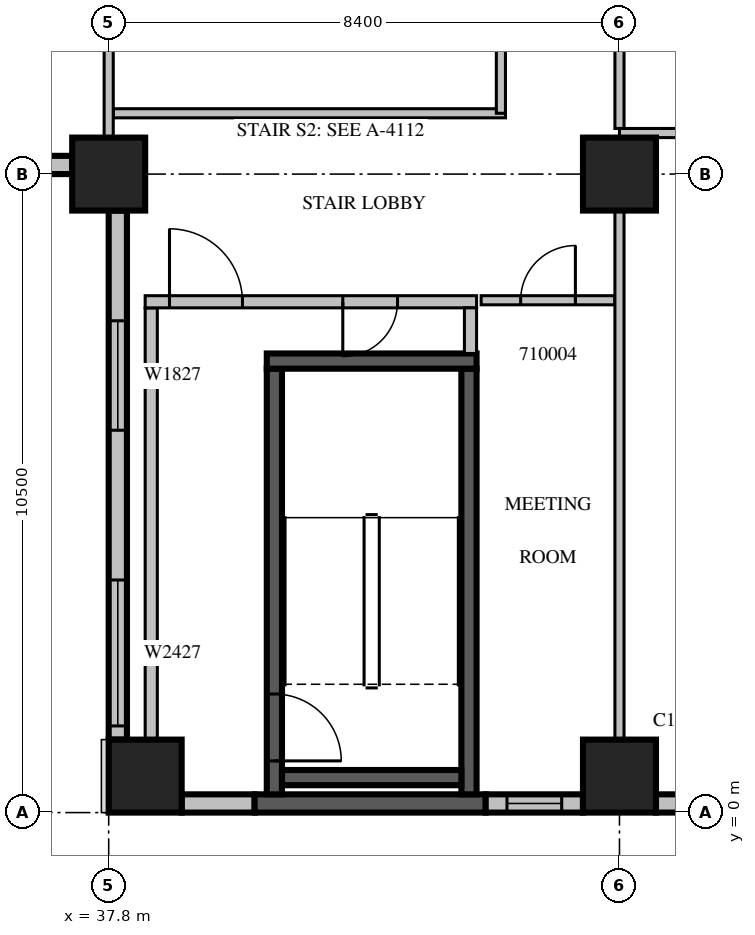
"""IFC4 building model, lengths in metres.
Left out: names, types, materials, properties, quantities, classifications, styles, units other than length and angle.
Written with IfcOpenShell. Run it as: python <this file> out.ifc"""

import sys

from ifc_helpers import new_model, si_unit, direction, frame, frame_2d, origin, origin_2d, place, context, subcontext, project, spatial, rectangle, extrude, source, transform, mapped, element, fill, save


model = new_model("IFC4")
c1 = context("Model", 3, precision=1e-05, world=origin(), true_north=direction((0.0, 1.0)))
c2 = subcontext(c1, "Body", "Model", "MODEL_VIEW")
j1 = project(units=[si_unit("LENGTHUNIT", "METRE"), si_unit("PLANEANGLEUNIT", "RADIAN")], contexts=[c1])
p1 = place(None, origin())
s1 = spatial("IfcSite", under=j1, at=p1, CompositionType="ELEMENT")
p2 = place(p1, origin())
s2 = spatial("IfcBuilding", under=s1, at=p2, CompositionType="ELEMENT")
p3 = place(p2, frame((0.0, 0.0, 53.1)))
s3 = spatial("IfcBuildingStorey", under=s2, at=p3, CompositionType="ELEMENT", Elevation=53.1)
m1 = source(origin(), c2, "Body", "SweptSolid", [
    extrude(rectangle(XDim=1.2, YDim=1.2, at=origin_2d()), origin(), (0.0, 0.0, 1.0), 4.2),
])
for number, where, z_axis, x_axis in (
    (1, (38.4, 0.6, 0.0), (0.0, 0.0, 1.0), (1.0, 0.0, 0.0)),
    (2, (46.2, 0.6, 0.0), (0.0, 0.0, 1.0), (1.0, 0.0, 0.0)),
    (3, (37.8, 10.5, 0.0), (0.0, 0.0, 1.0), (1.0, 0.0, 0.0)),
    (4, (46.2, 10.5, 0.0), (0.0, 0.0, 1.0), (1.0, 0.0, 0.0)),
):
    element("IfcColumn", number, at=place(p3, frame(where, z_axis=z_axis, x_axis=x_axis)), inside=s3, PredefinedType="COLUMN", context=c2, shape_type="MappedRepresentation", body=[
        mapped(m1, transform((0.0, 0.0, 0.0), scale=1.0)),
    ])
m2 = source(origin(), c2, "Body", "SweptSolid", [
    extrude(rectangle(XDim=7.2, YDim=0.3, at=frame_2d((3.6, 0.0))), origin(), (0.0, 0.0, 1.0), 3.8),
])
p4 = place(p3, frame((30.0, 10.65, 0.0), z_axis=(0.0, 0.0, 1.0), x_axis=(1.0, 0.0, 0.0)))
e5 = element("IfcWall", 5, at=p4, inside=s3, PredefinedType="STANDARD", context=c2, shape_type="MappedRepresentation", body=[
    mapped(m2, transform((0.0, 0.0, 0.0), scale=1.0)),
])
m3 = source(origin(), c2, "Body", "SweptSolid", [
    extrude(rectangle(XDim=1.8, YDim=2.7, at=frame_2d((0.9, 1.35))), frame((0.0, 0.16, 0.0), z_axis=(0.0, -1.0, 0.0), x_axis=(1.0, 0.0, 0.0)), (0.0, 0.0, 1.0), 0.32),
])
p5 = place(p4, frame((4.839, 0.0, 0.6)))
e6 = element("IfcOpeningElement", 6, at=p5, cuts=e5, PredefinedType="OPENING", context=c2, shape_type="MappedRepresentation", body=[
    mapped(m3, transform((0.0, 0.0, 0.0), scale=1.0)),
])
m4 = source(origin(), c2, "Body", "SweptSolid", [
    extrude(rectangle(XDim=1.2, YDim=2.7, at=frame_2d((0.6, 1.35))), frame((0.0, 0.16, 0.0), z_axis=(0.0, -1.0, 0.0), x_axis=(1.0, 0.0, 0.0)), (0.0, 0.0, 1.0), 0.32),
])
p6 = place(p4, frame((2.152, 0.0, 0.6)))
e7 = element("IfcOpeningElement", 7, at=p6, cuts=e5, PredefinedType="OPENING", context=c2, shape_type="MappedRepresentation", body=[
    mapped(m4, transform((0.0, 0.0, 0.0), scale=1.0)),
])
m5 = source(origin(), c2, "Body", "SweptSolid", [
    extrude(rectangle(XDim=8.7, YDim=0.3, at=frame_2d((4.35, 0.0))), origin(), (0.0, 0.0, 1.0), 3.8),
])
p7 = place(p3, frame((37.95, 9.9, 0.0), z_axis=(0.0, 0.0, 1.0), x_axis=(0.0, -1.0, 0.0)))
e8 = element("IfcWall", 8, at=p7, inside=s3, PredefinedType="STANDARD", context=c2, shape_type="MappedRepresentation", body=[
    mapped(m5, transform((0.0, 0.0, 0.0), scale=1.0)),
])
p8 = place(p7, frame((1.812, 0.0, 0.6)))
e9 = element("IfcOpeningElement", 9, at=p8, cuts=e8, PredefinedType="OPENING", context=c2, shape_type="MappedRepresentation", body=[
    mapped(m3, transform((0.0, 0.0, 0.0), scale=1.0)),
])
m6 = source(origin(), c2, "Body", "SweptSolid", [
    extrude(rectangle(XDim=2.4, YDim=2.7, at=frame_2d((1.2, 1.35))), frame((0.0, 0.16, 0.0), z_axis=(0.0, -1.0, 0.0), x_axis=(1.0, 0.0, 0.0)), (0.0, 0.0, 1.0), 0.32),
])
p9 = place(p7, frame((6.075, 0.0, 0.6)))
e10 = element("IfcOpeningElement", 10, at=p9, cuts=e8, PredefinedType="OPENING", context=c2, shape_type="MappedRepresentation", body=[
    mapped(m6, transform((0.0, 0.0, 0.0), scale=1.0)),
])
m7 = source(origin(), c2, "Body", "SweptSolid", [
    extrude(rectangle(XDim=1.2, YDim=0.3, at=frame_2d((0.6, 0.0))), origin(), (0.0, 0.0, 1.0), 3.8),
])
p10 = place(p3, frame((39.0, 0.15, 0.0), z_axis=(0.0, 0.0, 1.0), x_axis=(1.0, 0.0, 0.0)))
e11 = element("IfcWall", 11, at=p10, inside=s3, PredefinedType="STANDARD", context=c2, shape_type="MappedRepresentation", body=[
    mapped(m7, transform((0.0, 0.0, 0.0), scale=1.0)),
])
m8 = source(origin(), c2, "Body", "SweptSolid", [
    extrude(rectangle(XDim=3.8, YDim=0.3, at=frame_2d((1.9, 0.0))), origin(), (0.0, 0.0, 1.0), 3.8),
])
p11 = place(p3, frame((40.2, 0.15, 0.0), z_axis=(0.0, 0.0, 1.0), x_axis=(1.0, 0.0, 0.0)))
e12 = element("IfcWall", 12, at=p11, inside=s3, PredefinedType="SOLIDWALL", context=c2, shape_type="MappedRepresentation", body=[
    mapped(m8, transform((0.0, 0.0, 0.0), scale=1.0)),
])
m9 = source(origin(), c2, "Body", "SweptSolid", [
    extrude(rectangle(XDim=1.6, YDim=0.3, at=frame_2d((0.8, 0.0))), origin(), (0.0, 0.0, 1.0), 3.8),
])
p12 = place(p3, frame((44.0, 0.15, 0.0), z_axis=(0.0, 0.0, 1.0), x_axis=(1.0, 0.0, 0.0)))
e13 = element("IfcWall", 13, at=p12, inside=s3, PredefinedType="STANDARD", context=c2, shape_type="MappedRepresentation", body=[
    mapped(m9, transform((0.0, 0.0, 0.0), scale=1.0)),
])
m10 = source(origin(), c2, "Body", "SweptSolid", [
    extrude(rectangle(XDim=0.9, YDim=2.7, at=frame_2d((0.45, 1.35))), frame((0.0, 0.16, 0.0), z_axis=(0.0, -1.0, 0.0), x_axis=(1.0, 0.0, 0.0)), (0.0, 0.0, 1.0), 0.32),
])
p13 = place(p12, frame((0.35, 0.0, 0.6)))
e14 = element("IfcOpeningElement", 14, at=p13, cuts=e13, PredefinedType="OPENING", context=c2, shape_type="MappedRepresentation", body=[
    mapped(m10, transform((0.0, 0.0, 0.0), scale=1.0)),
])
m11 = source(origin(), c2, "Body", "SweptSolid", [
    extrude(rectangle(XDim=4.68, YDim=0.3, at=frame_2d((2.34, 0.0))), origin(), (0.0, 0.0, 1.0), 3.3),
])
p14 = place(p3, frame((46.8, 0.15, 0.0), z_axis=(0.0, 0.0, 1.0), x_axis=(1.0, 0.0, 0.0)))
e15 = element("IfcWall", 15, at=p14, inside=s3, PredefinedType="STANDARD", context=c2, shape_type="MappedRepresentation", body=[
    mapped(m11, transform((0.0, 0.0, 0.0), scale=1.0)),
])
m12 = source(origin(), c2, "Body", "SweptSolid", [
    extrude(rectangle(XDim=3.6, YDim=2.7, at=frame_2d((1.8, 1.35))), frame((0.0, 0.16, 0.0), z_axis=(0.0, -1.0, 0.0), x_axis=(1.0, 0.0, 0.0)), (0.0, 0.0, 1.0), 0.32),
])
p15 = place(p14, frame((0.54, 0.0, 0.6)))
e16 = element("IfcOpeningElement", 16, at=p15, cuts=e15, PredefinedType="OPENING", context=c2, shape_type="MappedRepresentation", body=[
    mapped(m12, transform((0.0, 0.0, 0.0), scale=1.0)),
])
m13 = source(origin(), c2, "Body", "SweptSolid", [
    extrude(rectangle(XDim=7.0, YDim=0.25, at=frame_2d((3.5, 0.0))), origin(), (0.0, 0.0, 1.0), 3.8),
])
p16 = place(p3, frame((40.525, 0.3, 0.0), z_axis=(0.0, 0.0, 1.0), x_axis=(0.0, 1.0, 0.0)))
e17 = element("IfcWall", 17, at=p16, inside=s3, PredefinedType="SOLIDWALL", context=c2, shape_type="MappedRepresentation", body=[
    mapped(m13, transform((0.0, 0.0, 0.0), scale=1.0)),
])
m14 = source(origin(), c2, "Body", "SweptSolid", [
    extrude(rectangle(XDim=1.1, YDim=2.1, at=frame_2d((0.55, 1.05))), frame((0.0, 0.135, 0.0), z_axis=(0.0, -1.0, 0.0), x_axis=(1.0, 0.0, 0.0)), (0.0, 0.0, 1.0), 0.27),
])
p17 = place(p16, frame((0.55, 0.0, 0.0)))
e18 = element("IfcOpeningElement", 18, at=p17, cuts=e17, PredefinedType="OPENING", context=c2, shape_type="MappedRepresentation", body=[
    mapped(m14, transform((0.0, 0.0, 0.0), scale=1.0)),
])
p18 = place(p3, frame((43.725, 0.3, 0.0), z_axis=(0.0, 0.0, 1.0), x_axis=(0.0, 1.0, 0.0)))
e19 = element("IfcWall", 19, at=p18, inside=s3, PredefinedType="SOLIDWALL", context=c2, shape_type="MappedRepresentation", body=[
    mapped(m13, transform((0.0, 0.0, 0.0), scale=1.0)),
])
m15 = source(origin(), c2, "Body", "SweptSolid", [
    extrude(rectangle(XDim=3.45, YDim=0.25, at=frame_2d((1.725, 0.0))), origin(), (0.0, 0.0, 1.0), 3.8),
])
p19 = place(p3, frame((40.4, 7.425, 0.0), z_axis=(0.0, 0.0, 1.0), x_axis=(1.0, 0.0, 0.0)))
e20 = element("IfcWall", 20, at=p19, inside=s3, PredefinedType="SOLIDWALL", context=c2, shape_type="MappedRepresentation", body=[
    mapped(m15, transform((0.0, 0.0, 0.0), scale=1.0)),
])
m16 = source(origin(), c2, "Body", "SweptSolid", [
    extrude(rectangle(XDim=2.95, YDim=0.25, at=frame_2d((1.475, 0.0))), origin(), (0.0, 0.0, 1.0), 3.8),
])
p20 = place(p3, frame((40.65, 0.575, 0.0), z_axis=(0.0, 0.0, 1.0), x_axis=(1.0, 0.0, 0.0)))
e21 = element("IfcWall", 21, at=p20, inside=s3, PredefinedType="SOLIDWALL", context=c2, shape_type="MappedRepresentation", body=[
    mapped(m16, transform((0.0, 0.0, 0.0), scale=1.0)),
])
m17 = source(origin(), c2, "Body", "SweptSolid", [
    extrude(rectangle(XDim=8.0, YDim=0.2, at=frame_2d((4.0, 0.0))), origin(), (0.0, 0.0, 1.0), 3.8),
])
p21 = place(p3, frame((38.5, 0.3, 0.0), z_axis=(0.0, 0.0, 1.0), x_axis=(0.0, 1.0, 0.0)))
e22 = element("IfcWall", 22, at=p21, inside=s3, PredefinedType="PARTITIONING", context=c2, shape_type="MappedRepresentation", body=[
    mapped(m17, transform((0.0, 0.0, 0.0), scale=1.0)),
])
m18 = source(origin(), c2, "Body", "SweptSolid", [
    extrude(rectangle(XDim=5.45, YDim=0.2, at=frame_2d((2.725, 0.0))), origin(), (0.0, 0.0, 1.0), 3.8),
])
p22 = place(p3, frame((38.4, 8.4, 0.0), z_axis=(0.0, 0.0, 1.0), x_axis=(1.0, 0.0, 0.0)))
e23 = element("IfcWall", 23, at=p22, inside=s3, PredefinedType="PARTITIONING", context=c2, shape_type="MappedRepresentation", body=[
    mapped(m18, transform((0.0, 0.0, 0.0), scale=1.0)),
])
m19 = source(origin(), c2, "Body", "SweptSolid", [
    extrude(rectangle(XDim=1.2, YDim=2.1, at=frame_2d((0.6, 1.05))), frame((0.0, 0.11, 0.0), z_axis=(0.0, -1.0, 0.0), x_axis=(1.0, 0.0, 0.0)), (0.0, 0.0, 1.0), 0.22),
])
p23 = place(p22, frame((0.4, 0.0, 0.0)))
e24 = element("IfcOpeningElement", 24, at=p23, cuts=e23, PredefinedType="OPENING", context=c2, shape_type="MappedRepresentation", body=[
    mapped(m19, transform((0.0, 0.0, 0.0), scale=1.0)),
])
m20 = source(origin(), c2, "Body", "SweptSolid", [
    extrude(rectangle(XDim=0.9, YDim=2.1, at=frame_2d((0.45, 1.05))), frame((0.0, 0.11, 0.0), z_axis=(0.0, -1.0, 0.0), x_axis=(1.0, 0.0, 0.0)), (0.0, 0.0, 1.0), 0.22),
])
p24 = place(p22, frame((3.25, 0.0, 0.0)))
e25 = element("IfcOpeningElement", 25, at=p24, cuts=e23, PredefinedType="OPENING", context=c2, shape_type="MappedRepresentation", body=[
    mapped(m20, transform((0.0, 0.0, 0.0), scale=1.0)),
])
m21 = source(origin(), c2, "Body", "SweptSolid", [
    extrude(rectangle(XDim=0.75, YDim=0.2, at=frame_2d((0.375, 0.0))), origin(), (0.0, 0.0, 1.0), 3.8),
])
p25 = place(p3, frame((43.75, 7.55, 0.0), z_axis=(0.0, 0.0, 1.0), x_axis=(0.0, 1.0, 0.0)))
e26 = element("IfcWall", 26, at=p25, inside=s3, PredefinedType="PARTITIONING", context=c2, shape_type="MappedRepresentation", body=[
    mapped(m21, transform((0.0, 0.0, 0.0), scale=1.0)),
])
m22 = source(origin(), c2, "Body", "SweptSolid", [
    extrude(rectangle(XDim=6.45, YDim=0.15, at=frame_2d((3.225, 0.0))), origin(), (0.0, 0.0, 1.0), 3.8),
])
p26 = place(p3, frame((37.875, 11.5, 0.0), z_axis=(0.0, 0.0, 1.0), x_axis=(1.0, 0.0, 0.0)))
e27 = element("IfcWall", 27, at=p26, inside=s3, PredefinedType="PARTITIONING", context=c2, shape_type="MappedRepresentation", body=[
    mapped(m22, transform((0.0, 0.0, 0.0), scale=1.0)),
])
m23 = source(origin(), c2, "Body", "SweptSolid", [
    extrude(rectangle(XDim=3.575, YDim=0.15, at=frame_2d((1.788, 0.0))), origin(), (0.0, 0.0, 1.0), 3.8),
])
p27 = place(p3, frame((44.25, 11.5, 0.0), z_axis=(0.0, 0.0, 1.0), x_axis=(0.0, 1.0, 0.0)))
e28 = element("IfcWall", 28, at=p27, inside=s3, PredefinedType="PARTITIONING", context=c2, shape_type="MappedRepresentation", body=[
    mapped(m23, transform((0.0, 0.0, 0.0), scale=1.0)),
])
m24 = source(origin(), c2, "Body", "SweptSolid", [
    extrude(rectangle(XDim=2.2, YDim=0.15, at=frame_2d((1.1, 0.0))), origin(), (0.0, 0.0, 1.0), 3.8),
])
p28 = place(p3, frame((46.125, 8.425, 0.0), z_axis=(0.0, 0.0, 1.0), x_axis=(-1.0, 0.0, 0.0)))
e29 = element("IfcWall", 29, at=p28, inside=s3, PredefinedType="PARTITIONING", context=c2, shape_type="MappedRepresentation", body=[
    mapped(m24, transform((0.0, 0.0, 0.0), scale=1.0)),
])
m25 = source(origin(), c2, "Body", "SweptSolid", [
    extrude(rectangle(XDim=0.9, YDim=2.1, at=frame_2d((0.45, 1.05))), frame((0.0, 0.085, 0.0), z_axis=(0.0, -1.0, 0.0), x_axis=(1.0, 0.0, 0.0)), (0.0, 0.0, 1.0), 0.17),
])
p29 = place(p28, frame((0.65, 0.0, 0.0)))
e30 = element("IfcOpeningElement", 30, at=p29, cuts=e29, PredefinedType="OPENING", context=c2, shape_type="MappedRepresentation", body=[
    mapped(m25, transform((0.0, 0.0, 0.0), scale=1.0)),
])
m26 = source(origin(), c2, "Body", "SweptSolid", [
    extrude(rectangle(XDim=3.901, YDim=0.15, at=frame_2d((1.95, 0.0))), origin(), (0.0, 0.0, 1.0), 3.8),
])
p30 = place(p3, frame((37.8, 11.099, 0.0), z_axis=(0.0, 0.0, 1.0), x_axis=(0.0, 1.0, 0.0)))
e31 = element("IfcWall", 31, at=p30, inside=s3, PredefinedType="PARTITIONING", context=c2, shape_type="MappedRepresentation", body=[
    mapped(m26, transform((0.0, 0.0, 0.0), scale=1.0)),
])
m27 = source(origin(), c2, "Body", "SweptSolid", [
    extrude(rectangle(XDim=8.702, YDim=0.15, at=frame_2d((4.351, 0.0))), origin(), (0.0, 0.0, 1.0), 3.8),
])
p31 = place(p3, frame((46.2, 1.199, 0.0), z_axis=(0.0, 0.0, 1.0), x_axis=(0.0, 1.0, 0.0)))
e32 = element("IfcWall", 32, at=p31, inside=s3, PredefinedType="PARTITIONING", context=c2, shape_type="MappedRepresentation", body=[
    mapped(m27, transform((0.0, 0.0, 0.0), scale=1.0)),
])
m28 = source(origin(), c2, "Body", "SweptSolid", [
    extrude(rectangle(XDim=3.75, YDim=0.15, at=frame_2d((1.875, 0.0))), origin(), (0.0, 0.0, 1.0), 3.8),
])
p32 = place(p3, frame((46.2, 11.25, 0.0), z_axis=(0.0, 0.0, 1.0), x_axis=(0.0, 1.0, 0.0)))
e33 = element("IfcWall", 33, at=p32, inside=s3, PredefinedType="PARTITIONING", context=c2, shape_type="MappedRepresentation", body=[
    mapped(m28, transform((0.0, 0.0, 0.0), scale=1.0)),
])
m29 = source(origin(), c2, "Body", "SweptSolid", [
    extrude(rectangle(XDim=24.9, YDim=0.15, at=frame_2d((12.45, 0.0))), origin(), (0.0, 0.0, 1.0), 3.8),
])
p33 = place(p3, frame((71.1, 11.175, 0.0), z_axis=(0.0, 0.0, 1.0), x_axis=(-1.0, 0.0, 0.0)))
e34 = element("IfcWall", 34, at=p33, inside=s3, PredefinedType="PARTITIONING", context=c2, shape_type="MappedRepresentation", body=[
    mapped(m29, transform((0.0, 0.0, 0.0), scale=1.0)),
])
m30 = source(origin(), c2, "Body", "SweptSolid", [
    extrude(rectangle(XDim=1.1, YDim=2.1, at=frame_2d((0.55, 1.05))), frame((0.0, 0.085, 0.0), z_axis=(0.0, -1.0, 0.0), x_axis=(1.0, 0.0, 0.0)), (0.0, 0.0, 1.0), 0.17),
])
p34 = place(p33, frame((4.508, 0.0, 0.0)))
e35 = element("IfcOpeningElement", 35, at=p34, cuts=e34, PredefinedType="OPENING", context=c2, shape_type="MappedRepresentation", body=[
    mapped(m30, transform((0.0, 0.0, 0.0), scale=1.0)),
])
p35 = place(p33, frame((2.143, 0.0, 0.0)))
e36 = element("IfcOpeningElement", 36, at=p35, cuts=e34, PredefinedType="OPENING", context=c2, shape_type="MappedRepresentation", body=[
    mapped(m30, transform((0.0, 0.0, 0.0), scale=1.0)),
])
m31 = source(origin(), c2, "Body", "SweptSolid", [
    extrude(rectangle(XDim=1.8, YDim=2.7, at=frame_2d((0.9, 1.35))), frame((0.0, 0.03, 0.0), z_axis=(0.0, -1.0, 0.0), x_axis=(1.0, 0.0, 0.0)), (0.0, 0.0, 1.0), 0.06),
])
p36 = place(p8, origin())
e37 = element("IfcWindow", 37, at=p36, inside=s3, PartitioningType="SINGLE_PANEL", PredefinedType="WINDOW", context=c2, shape_type="MappedRepresentation", body=[
    mapped(m31, transform((0.0, 0.0, 0.0), scale=1.0)),
])
fill(e9, e37)
m32 = source(origin(), c2, "Body", "SweptSolid", [
    extrude(rectangle(XDim=2.4, YDim=2.7, at=frame_2d((1.2, 1.35))), frame((0.0, 0.03, 0.0), z_axis=(0.0, -1.0, 0.0), x_axis=(1.0, 0.0, 0.0)), (0.0, 0.0, 1.0), 0.06),
])
p37 = place(p9, origin())
e38 = element("IfcWindow", 38, at=p37, inside=s3, PartitioningType="SINGLE_PANEL", PredefinedType="WINDOW", context=c2, shape_type="MappedRepresentation", body=[
    mapped(m32, transform((0.0, 0.0, 0.0), scale=1.0)),
])
fill(e10, e38)
m33 = source(origin(), c2, "Body", "SweptSolid", [
    extrude(rectangle(XDim=0.9, YDim=2.7, at=frame_2d((0.45, 1.35))), frame((0.0, 0.03, 0.0), z_axis=(0.0, -1.0, 0.0), x_axis=(1.0, 0.0, 0.0)), (0.0, 0.0, 1.0), 0.06),
])
p38 = place(p13, origin())
e39 = element("IfcWindow", 39, at=p38, inside=s3, PartitioningType="SINGLE_PANEL", PredefinedType="WINDOW", context=c2, shape_type="MappedRepresentation", body=[
    mapped(m33, transform((0.0, 0.0, 0.0), scale=1.0)),
])
fill(e14, e39)
m34 = source(origin(), c2, "Body", "SweptSolid", [
    extrude(rectangle(XDim=1.1, YDim=2.1, at=frame_2d((0.55, 1.05))), frame((0.0, 0.025, 0.0), z_axis=(0.0, -1.0, 0.0), x_axis=(1.0, 0.0, 0.0)), (0.0, 0.0, 1.0), 0.05),
])
p39 = place(p17, origin())
e40 = element("IfcDoor", 40, at=p39, inside=s3, OperationType="SINGLE_SWING_RIGHT", PredefinedType="DOOR", context=c2, shape_type="MappedRepresentation", body=[
    mapped(m34, transform((0.0, 0.0, 0.0), scale=1.0)),
])
fill(e18, e40)
m35 = source(origin(), c2, "Body", "SweptSolid", [
    extrude(rectangle(XDim=1.2, YDim=2.1, at=frame_2d((0.6, 1.05))), frame((0.0, 0.025, 0.0), z_axis=(0.0, -1.0, 0.0), x_axis=(1.0, 0.0, 0.0)), (0.0, 0.0, 1.0), 0.05),
])
p40 = place(p23, origin())
e41 = element("IfcDoor", 41, at=p40, inside=s3, OperationType="SINGLE_SWING_LEFT", PredefinedType="DOOR", context=c2, shape_type="MappedRepresentation", body=[
    mapped(m35, transform((0.0, 0.0, 0.0), scale=1.0)),
])
fill(e24, e41)
m36 = source(origin(), c2, "Body", "SweptSolid", [
    extrude(rectangle(XDim=0.9, YDim=2.1, at=frame_2d((0.45, 1.05))), frame((0.0, 0.025, 0.0), z_axis=(0.0, -1.0, 0.0), x_axis=(1.0, 0.0, 0.0)), (0.0, 0.0, 1.0), 0.05),
])
p41 = place(p24, origin())
e42 = element("IfcDoor", 42, at=p41, inside=s3, OperationType="SINGLE_SWING_RIGHT", PredefinedType="DOOR", context=c2, shape_type="MappedRepresentation", body=[
    mapped(m36, transform((0.0, 0.0, 0.0), scale=1.0)),
])
fill(e25, e42)
p42 = place(p29, origin())
e43 = element("IfcDoor", 43, at=p42, inside=s3, OperationType="SINGLE_SWING_RIGHT", PredefinedType="DOOR", context=c2, shape_type="MappedRepresentation", body=[
    mapped(m36, transform((0.0, 0.0, 0.0), scale=1.0)),
])
fill(e30, e43)
save(model, sys.argv[1])
